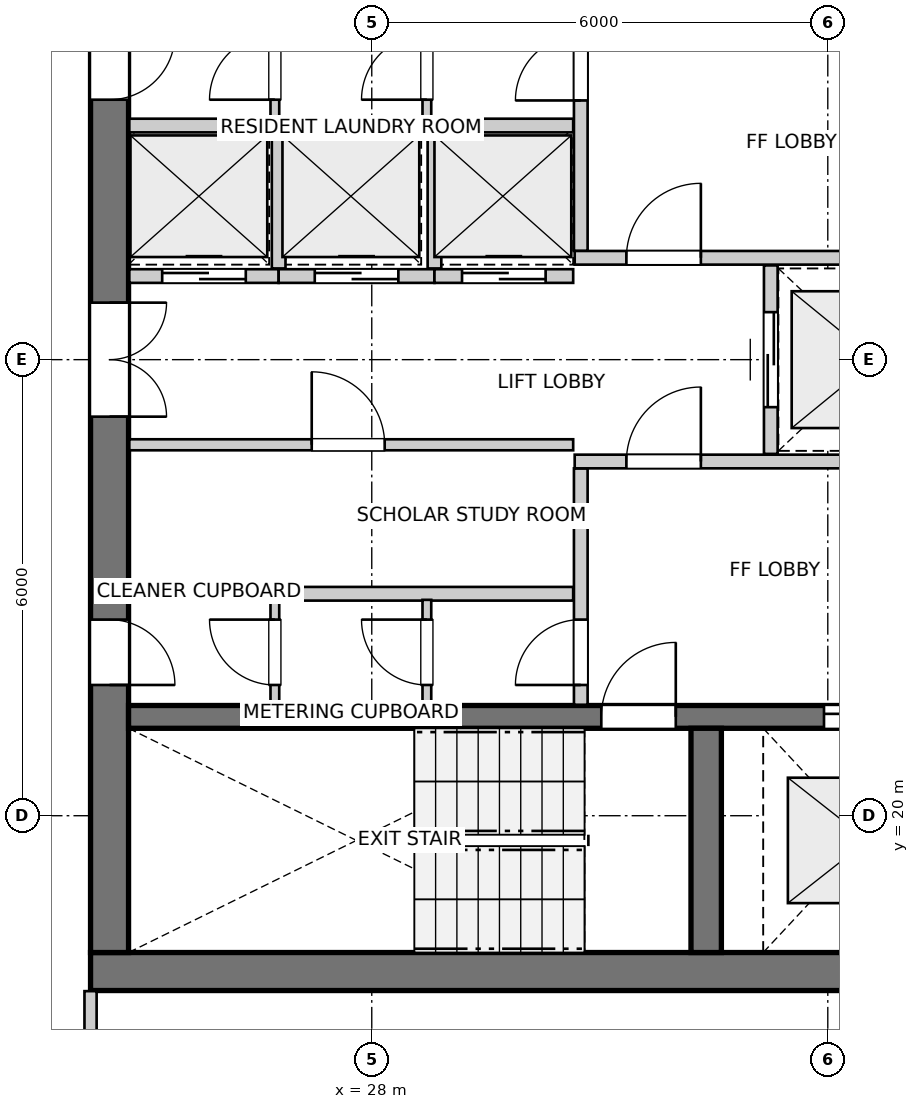
"""IFC4 building model, lengths in metres.
Left out: names, types, materials, properties, quantities, classifications, styles, units other than length and angle.
Written with IfcOpenShell. Run it as: python <this file> out.ifc"""

import sys

from ifc_helpers import new_model, si_unit, direction, frame, frame_2d, origin, place, context, subcontext, project, spatial, rectangle, extrude, source, transform, mapped, element, fill, save


model = new_model("IFC4")
c1 = context("Model", 3, precision=1e-05, world=origin(), true_north=direction((0.0, 1.0)))
c2 = subcontext(c1, "Body", "Model", "MODEL_VIEW")
j1 = project(units=[si_unit("LENGTHUNIT", "METRE"), si_unit("PLANEANGLEUNIT", "RADIAN")], contexts=[c1])
p1 = place(None, origin())
s1 = spatial("IfcSite", under=j1, at=p1, CompositionType="ELEMENT")
p2 = place(p1, origin())
s2 = spatial("IfcBuilding", under=s1, at=p2, CompositionType="ELEMENT")
p3 = place(p2, frame((0.0, 0.0, 218.0)))
s3 = spatial("IfcBuildingStorey", under=s2, at=p3, CompositionType="ELEMENT", Elevation=218.0)
p4 = place(p3, frame((24.3, 17.95, 0.0), z_axis=(0.0, 0.0, 1.0), x_axis=(1.0, 0.0, 0.0)))
e1 = element("IfcWall", 1, at=p4, inside=s3, PredefinedType="SHEAR", context=c2, shape_type="SweptSolid", body=[
    extrude(rectangle(XDim=12.1, YDim=0.5, at=frame_2d((6.05, 0.0))), origin(), (0.0, 0.0, 1.0), 2.96),
])
p5 = place(p3, frame((24.55, 33.8, 0.0), z_axis=(0.0, 0.0, 1.0), x_axis=(0.0, -1.0, 0.0)))
e2 = element("IfcWall", 2, at=p5, inside=s3, PredefinedType="SHEAR", context=c2, shape_type="SweptSolid", body=[
    extrude(rectangle(XDim=15.6, YDim=0.5, at=frame_2d((7.8, 0.0))), origin(), (0.0, 0.0, 1.0), 2.96),
])
p6 = place(p5, frame((7.05, 0.0, 0.0)))
e3 = element("IfcOpeningElement", 3, at=p6, cuts=e2, PredefinedType="OPENING", context=c2, shape_type="SweptSolid", body=[
    extrude(rectangle(XDim=1.5, YDim=2.15, at=frame_2d((0.75, 1.075))), frame((0.0, 0.26, 0.0), z_axis=(0.0, -1.0, 0.0), x_axis=(1.0, 0.0, 0.0)), (0.0, 0.0, 1.0), 0.52),
])
p7 = place(p5, frame((3.52, 0.0, 0.0)))
e4 = element("IfcOpeningElement", 4, at=p7, cuts=e2, PredefinedType="OPENING", context=c2, shape_type="SweptSolid", body=[
    extrude(rectangle(XDim=0.86, YDim=2.05, at=frame_2d((0.43, 1.025))), frame((0.0, 0.26, 0.0), z_axis=(0.0, -1.0, 0.0), x_axis=(1.0, 0.0, 0.0)), (0.0, 0.0, 1.0), 0.52),
])
p8 = place(p5, frame((11.22, 0.0, 0.0)))
e5 = element("IfcOpeningElement", 5, at=p8, cuts=e2, PredefinedType="OPENING", context=c2, shape_type="SweptSolid", body=[
    extrude(rectangle(XDim=0.86, YDim=2.05, at=frame_2d((0.43, 1.025))), frame((0.0, 0.26, 0.0), z_axis=(0.0, -1.0, 0.0), x_axis=(1.0, 0.0, 0.0)), (0.0, 0.0, 1.0), 0.52),
])
p9 = place(p3, frame((24.8, 21.3, 0.0), z_axis=(0.0, 0.0, 1.0), x_axis=(1.0, 0.0, 0.0)))
e6 = element("IfcWall", 6, at=p9, inside=s3, PredefinedType="SHEAR", context=c2, shape_type="SweptSolid", body=[
    extrude(rectangle(XDim=11.1, YDim=0.3, at=frame_2d((5.55, 0.0))), origin(), (0.0, 0.0, 1.0), 2.96),
])
p10 = place(p9, frame((6.22, 0.0, 0.0)))
e7 = element("IfcOpeningElement", 7, at=p10, cuts=e6, PredefinedType="OPENING", context=c2, shape_type="SweptSolid", body=[
    extrude(rectangle(XDim=0.98, YDim=2.15, at=frame_2d((0.49, 1.075))), frame((0.0, 0.16, 0.0), z_axis=(0.0, -1.0, 0.0), x_axis=(1.0, 0.0, 0.0)), (0.0, 0.0, 1.0), 0.32),
])
p11 = place(p9, frame((9.15, 0.0, 0.0)))
e8 = element("IfcOpeningElement", 8, at=p11, cuts=e6, PredefinedType="OPENING", context=c2, shape_type="SweptSolid", body=[
    extrude(rectangle(XDim=1.15, YDim=2.15, at=frame_2d((0.575, 1.075))), frame((0.0, 0.16, 0.0), z_axis=(0.0, -1.0, 0.0), x_axis=(1.0, 0.0, 0.0)), (0.0, 0.0, 1.0), 0.32),
])
p12 = place(p3, frame((32.4, 18.2, 0.0), z_axis=(0.0, 0.0, 1.0), x_axis=(0.0, 1.0, 0.0)))
e9 = element("IfcWall", 9, at=p12, inside=s3, PredefinedType="SHEAR", context=c2, shape_type="SweptSolid", body=[
    extrude(rectangle(XDim=2.95, YDim=0.4, at=frame_2d((1.475, 0.0))), origin(), (0.0, 0.0, 1.0), 2.96),
])
p13 = place(p3, frame((30.75, 21.46, 0.0), z_axis=(0.0, 0.0, 1.0), x_axis=(0.0, 1.0, 0.0)))
e10 = element("IfcWall", 10, at=p13, inside=s3, PredefinedType="PARTITIONING", context=c2, shape_type="SweptSolid", body=[
    extrude(rectangle(XDim=3.11, YDim=0.18, at=frame_2d((1.555, 0.0))), origin(), (0.0, 0.0, 1.0), 2.96),
])
p14 = place(p13, frame((0.26, 0.0, 0.0)))
e11 = element("IfcOpeningElement", 11, at=p14, cuts=e10, PredefinedType="OPENING", context=c2, shape_type="SweptSolid", body=[
    extrude(rectangle(XDim=0.86, YDim=2.05, at=frame_2d((0.43, 1.025))), frame((0.0, 0.1, 0.0), z_axis=(0.0, -1.0, 0.0), x_axis=(1.0, 0.0, 0.0)), (0.0, 0.0, 1.0), 0.2),
])
p15 = place(p3, frame((30.67, 24.66, 0.0), z_axis=(0.0, 0.0, 1.0), x_axis=(1.0, 0.0, 0.0)))
e12 = element("IfcWall", 12, at=p15, inside=s3, PredefinedType="PARTITIONING", context=c2, shape_type="SweptSolid", body=[
    extrude(rectangle(XDim=5.22, YDim=0.18, at=frame_2d((2.61, 0.0))), origin(), (0.0, 0.0, 1.0), 2.96),
])
p16 = place(p15, frame((0.68, 0.0, 0.0)))
e13 = element("IfcOpeningElement", 13, at=p16, cuts=e12, PredefinedType="OPENING", context=c2, shape_type="SweptSolid", body=[
    extrude(rectangle(XDim=0.98, YDim=2.15, at=frame_2d((0.49, 1.075))), frame((0.0, 0.1, 0.0), z_axis=(0.0, -1.0, 0.0), x_axis=(1.0, 0.0, 0.0)), (0.0, 0.0, 1.0), 0.2),
])
p17 = place(p3, frame((30.75, 27.43, 0.0), z_axis=(0.0, 0.0, 1.0), x_axis=(0.0, 1.0, 0.0)))
e14 = element("IfcWall", 14, at=p17, inside=s3, PredefinedType="PARTITIONING", context=c2, shape_type="SweptSolid", body=[
    extrude(rectangle(XDim=3.11, YDim=0.18, at=frame_2d((1.555, 0.0))), origin(), (0.0, 0.0, 1.0), 2.96),
])
p18 = place(p17, frame((1.98, 0.0, 0.0)))
e15 = element("IfcOpeningElement", 15, at=p18, cuts=e14, PredefinedType="OPENING", context=c2, shape_type="SweptSolid", body=[
    extrude(rectangle(XDim=0.86, YDim=2.05, at=frame_2d((0.43, 1.025))), frame((0.0, 0.1, 0.0), z_axis=(0.0, -1.0, 0.0), x_axis=(1.0, 0.0, 0.0)), (0.0, 0.0, 1.0), 0.2),
])
p19 = place(p3, frame((30.67, 27.34, 0.0), z_axis=(0.0, 0.0, 1.0), x_axis=(1.0, 0.0, 0.0)))
e16 = element("IfcWall", 16, at=p19, inside=s3, PredefinedType="PARTITIONING", context=c2, shape_type="SweptSolid", body=[
    extrude(rectangle(XDim=5.22, YDim=0.18, at=frame_2d((2.61, 0.0))), origin(), (0.0, 0.0, 1.0), 2.96),
])
p20 = place(p19, frame((0.68, 0.0, 0.0)))
e17 = element("IfcOpeningElement", 17, at=p20, cuts=e16, PredefinedType="OPENING", context=c2, shape_type="SweptSolid", body=[
    extrude(rectangle(XDim=0.98, YDim=2.15, at=frame_2d((0.49, 1.075))), frame((0.0, 0.1, 0.0), z_axis=(0.0, -1.0, 0.0), x_axis=(1.0, 0.0, 0.0)), (0.0, 0.0, 1.0), 0.2),
])
p21 = place(p3, frame((33.25, 24.76, 0.0), z_axis=(0.0, 0.0, 1.0), x_axis=(0.0, 1.0, 0.0)))
e18 = element("IfcWall", 18, at=p21, inside=s3, PredefinedType="PARTITIONING", context=c2, shape_type="SweptSolid", body=[
    extrude(rectangle(XDim=2.48, YDim=0.18, at=frame_2d((1.24, 0.0))), origin(), (0.0, 0.0, 1.0), 2.96),
])
p22 = place(p21, frame((0.615, 0.0, 0.0)))
e19 = element("IfcOpeningElement", 19, at=p22, cuts=e18, PredefinedType="OPENING", context=c2, shape_type="SweptSolid", body=[
    extrude(rectangle(XDim=1.25, YDim=2.15, at=frame_2d((0.625, 1.075))), frame((0.0, 0.1, 0.0), z_axis=(0.0, -1.0, 0.0), x_axis=(1.0, 0.0, 0.0)), (0.0, 0.0, 1.0), 0.2),
])
p23 = place(p3, frame((24.81, 22.92, 0.0), z_axis=(0.0, 0.0, 1.0), x_axis=(1.0, 0.0, 0.0)))
e20 = element("IfcWall", 20, at=p23, inside=s3, PredefinedType="PARTITIONING", context=c2, shape_type="SweptSolid", body=[
    extrude(rectangle(XDim=5.84, YDim=0.18, at=frame_2d((2.92, 0.0))), origin(), (0.0, 0.0, 1.0), 2.96),
])
p24 = place(p3, frame((24.81, 24.88, 0.0), z_axis=(0.0, 0.0, 1.0), x_axis=(1.0, 0.0, 0.0)))
e21 = element("IfcWall", 21, at=p24, inside=s3, PredefinedType="PARTITIONING", context=c2, shape_type="SweptSolid", body=[
    extrude(rectangle(XDim=5.84, YDim=0.145, at=frame_2d((2.92, 0.0))), origin(), (0.0, 0.0, 1.0), 2.96),
])
p25 = place(p24, frame((2.4, 0.0, 0.0)))
e22 = element("IfcOpeningElement", 22, at=p25, cuts=e21, PredefinedType="OPENING", context=c2, shape_type="SweptSolid", body=[
    extrude(rectangle(XDim=0.96, YDim=2.1, at=frame_2d((0.48, 1.05))), frame((0.0, 0.083, 0.0), z_axis=(0.0, -1.0, 0.0), x_axis=(1.0, 0.0, 0.0)), (0.0, 0.0, 1.0), 0.165),
])
p26 = place(p3, frame((24.81, 29.08, 0.0), z_axis=(0.0, 0.0, 1.0), x_axis=(1.0, 0.0, 0.0)))
e23 = element("IfcWall", 23, at=p26, inside=s3, PredefinedType="PARTITIONING", context=c2, shape_type="SweptSolid", body=[
    extrude(rectangle(XDim=5.84, YDim=0.18, at=frame_2d((2.92, 0.0))), origin(), (0.0, 0.0, 1.0), 2.96),
])
p27 = place(p3, frame((24.81, 27.1, 0.0), z_axis=(0.0, 0.0, 1.0), x_axis=(1.0, 0.0, 0.0)))
e24 = element("IfcWall", 24, at=p27, inside=s3, PredefinedType="PARTITIONING", context=c2, shape_type="SweptSolid", body=[
    extrude(rectangle(XDim=1.965, YDim=0.18, at=frame_2d((0.982, 0.0))), origin(), (0.0, 0.0, 1.0), 2.96),
])
p28 = place(p27, frame((0.433, 0.0, 0.0)))
e25 = element("IfcOpeningElement", 25, at=p28, cuts=e24, PredefinedType="OPENING", context=c2, shape_type="SweptSolid", body=[
    extrude(rectangle(XDim=1.1, YDim=2.15, at=frame_2d((0.55, 1.075))), frame((0.0, 0.1, 0.0), z_axis=(0.0, -1.0, 0.0), x_axis=(1.0, 0.0, 0.0)), (0.0, 0.0, 1.0), 0.2),
])
p29 = place(p3, frame((26.775, 27.1, 0.0), z_axis=(0.0, 0.0, 1.0), x_axis=(1.0, 0.0, 0.0)))
e26 = element("IfcWall", 26, at=p29, inside=s3, PredefinedType="PARTITIONING", context=c2, shape_type="SweptSolid", body=[
    extrude(rectangle(XDim=2.05, YDim=0.18, at=frame_2d((1.025, 0.0))), origin(), (0.0, 0.0, 1.0), 2.96),
])
p30 = place(p29, frame((0.475, 0.0, 0.0)))
e27 = element("IfcOpeningElement", 27, at=p30, cuts=e26, PredefinedType="OPENING", context=c2, shape_type="SweptSolid", body=[
    extrude(rectangle(XDim=1.1, YDim=2.15, at=frame_2d((0.55, 1.075))), frame((0.0, 0.1, 0.0), z_axis=(0.0, -1.0, 0.0), x_axis=(1.0, 0.0, 0.0)), (0.0, 0.0, 1.0), 0.2),
])
p31 = place(p3, frame((26.775, 27.2, 0.0), z_axis=(0.0, 0.0, 1.0), x_axis=(0.0, 1.0, 0.0)))
e28 = element("IfcWall", 28, at=p31, inside=s3, PredefinedType="PARTITIONING", context=c2, shape_type="SweptSolid", body=[
    extrude(rectangle(XDim=1.78, YDim=0.18, at=frame_2d((0.89, 0.0))), origin(), (0.0, 0.0, 1.0), 2.96),
])
p32 = place(p3, frame((28.825, 27.1, 0.0), z_axis=(0.0, 0.0, 1.0), x_axis=(1.0, 0.0, 0.0)))
e29 = element("IfcWall", 29, at=p32, inside=s3, PredefinedType="PARTITIONING", context=c2, shape_type="SweptSolid", body=[
    extrude(rectangle(XDim=1.825, YDim=0.18, at=frame_2d((0.913, 0.0))), origin(), (0.0, 0.0, 1.0), 2.96),
])
p33 = place(p32, frame((0.363, 0.0, 0.0)))
e30 = element("IfcOpeningElement", 30, at=p33, cuts=e29, PredefinedType="OPENING", context=c2, shape_type="SweptSolid", body=[
    extrude(rectangle(XDim=1.1, YDim=2.15, at=frame_2d((0.55, 1.075))), frame((0.0, 0.1, 0.0), z_axis=(0.0, -1.0, 0.0), x_axis=(1.0, 0.0, 0.0)), (0.0, 0.0, 1.0), 0.2),
])
p34 = place(p3, frame((28.825, 27.2, 0.0), z_axis=(0.0, 0.0, 1.0), x_axis=(0.0, 1.0, 0.0)))
e31 = element("IfcWall", 31, at=p34, inside=s3, PredefinedType="PARTITIONING", context=c2, shape_type="SweptSolid", body=[
    extrude(rectangle(XDim=1.78, YDim=0.18, at=frame_2d((0.89, 0.0))), origin(), (0.0, 0.0, 1.0), 2.96),
])
p35 = place(p3, frame((26.725, 21.46, 0.0), z_axis=(0.0, 0.0, 1.0), x_axis=(0.0, 1.0, 0.0)))
e32 = element("IfcWall", 32, at=p35, inside=s3, PredefinedType="PARTITIONING", context=c2, shape_type="SweptSolid", body=[
    extrude(rectangle(XDim=1.38, YDim=0.115, at=frame_2d((0.69, 0.0))), origin(), (0.0, 0.0, 1.0), 2.96),
])
p36 = place(p35, frame((0.26, 0.0, 0.0)))
e33 = element("IfcOpeningElement", 33, at=p36, cuts=e32, PredefinedType="OPENING", context=c2, shape_type="SweptSolid", body=[
    extrude(rectangle(XDim=0.86, YDim=2.05, at=frame_2d((0.43, 1.025))), frame((0.0, 0.067, 0.0), z_axis=(0.0, -1.0, 0.0), x_axis=(1.0, 0.0, 0.0)), (0.0, 0.0, 1.0), 0.135),
])
p37 = place(p3, frame((26.725, 29.16, 0.0), z_axis=(0.0, 0.0, 1.0), x_axis=(0.0, 1.0, 0.0)))
e34 = element("IfcWall", 34, at=p37, inside=s3, PredefinedType="PARTITIONING", context=c2, shape_type="SweptSolid", body=[
    extrude(rectangle(XDim=1.38, YDim=0.115, at=frame_2d((0.69, 0.0))), origin(), (0.0, 0.0, 1.0), 2.96),
])
p38 = place(p37, frame((0.26, 0.0, 0.0)))
e35 = element("IfcOpeningElement", 35, at=p38, cuts=e34, PredefinedType="OPENING", context=c2, shape_type="SweptSolid", body=[
    extrude(rectangle(XDim=0.86, YDim=2.05, at=frame_2d((0.43, 1.025))), frame((0.0, 0.067, 0.0), z_axis=(0.0, -1.0, 0.0), x_axis=(1.0, 0.0, 0.0)), (0.0, 0.0, 1.0), 0.135),
])
p39 = place(p3, frame((28.725, 21.46, 0.0), z_axis=(0.0, 0.0, 1.0), x_axis=(0.0, 1.0, 0.0)))
e36 = element("IfcWall", 36, at=p39, inside=s3, PredefinedType="PARTITIONING", context=c2, shape_type="SweptSolid", body=[
    extrude(rectangle(XDim=1.38, YDim=0.115, at=frame_2d((0.69, 0.0))), origin(), (0.0, 0.0, 1.0), 2.96),
])
p40 = place(p39, frame((0.26, 0.0, 0.0)))
e37 = element("IfcOpeningElement", 37, at=p40, cuts=e36, PredefinedType="OPENING", context=c2, shape_type="SweptSolid", body=[
    extrude(rectangle(XDim=0.86, YDim=2.05, at=frame_2d((0.43, 1.025))), frame((0.0, 0.067, 0.0), z_axis=(0.0, -1.0, 0.0), x_axis=(1.0, 0.0, 0.0)), (0.0, 0.0, 1.0), 0.135),
])
p41 = place(p3, frame((28.725, 29.16, 0.0), z_axis=(0.0, 0.0, 1.0), x_axis=(0.0, 1.0, 0.0)))
e38 = element("IfcWall", 38, at=p41, inside=s3, PredefinedType="PARTITIONING", context=c2, shape_type="SweptSolid", body=[
    extrude(rectangle(XDim=1.38, YDim=0.115, at=frame_2d((0.69, 0.0))), origin(), (0.0, 0.0, 1.0), 2.96),
])
p42 = place(p41, frame((0.26, 0.0, 0.0)))
e39 = element("IfcOpeningElement", 39, at=p42, cuts=e38, PredefinedType="OPENING", context=c2, shape_type="SweptSolid", body=[
    extrude(rectangle(XDim=0.86, YDim=2.05, at=frame_2d((0.43, 1.025))), frame((0.0, 0.067, 0.0), z_axis=(0.0, -1.0, 0.0), x_axis=(1.0, 0.0, 0.0)), (0.0, 0.0, 1.0), 0.135),
])
p43 = place(p3, frame((24.3, 15.042, 0.0), z_axis=(0.0, 0.0, 1.0), x_axis=(0.0, 1.0, 0.0)))
e40 = element("IfcWall", 40, at=p43, inside=s3, PredefinedType="PARTITIONING", context=c2, shape_type="SweptSolid", body=[
    extrude(rectangle(XDim=2.65, YDim=0.16, at=frame_2d((1.325, 0.0))), origin(), (0.0, 0.0, 1.0), 2.96),
])
m1 = source(origin(), c2, "Body", "SweptSolid", [
    extrude(rectangle(XDim=0.98, YDim=2.15, at=frame_2d((0.49, 1.075))), frame((0.0, 0.025, 0.0), z_axis=(0.0, -1.0, 0.0), x_axis=(1.0, 0.0, 0.0)), (0.0, 0.0, 1.0), 0.05),
])
p44 = place(p10, origin())
e41 = element("IfcDoor", 41, at=p44, inside=s3, OperationType="SINGLE_SWING_RIGHT", PredefinedType="DOOR", context=c2, shape_type="MappedRepresentation", body=[
    mapped(m1, transform((0.0, 0.0, 0.0), x_axis=(1.0, 0.0, 0.0), y_axis=(0.0, 1.0, 0.0), z_axis=(0.0, 0.0, 1.0), scale=1.0)),
])
fill(e7, e41)
m2 = source(origin(), c2, "Body", "SweptSolid", [
    extrude(rectangle(XDim=1.15, YDim=2.15, at=frame_2d((0.575, 1.075))), frame((0.0, 0.025, 0.0), z_axis=(0.0, -1.0, 0.0), x_axis=(1.0, 0.0, 0.0)), (0.0, 0.0, 1.0), 0.05),
])
p45 = place(p11, origin())
e42 = element("IfcDoor", 42, at=p45, inside=s3, OperationType="DOUBLE_DOOR_SLIDING", PredefinedType="DOOR", context=c2, shape_type="MappedRepresentation", body=[
    mapped(m2, transform((0.0, 0.0, 0.0), x_axis=(1.0, 0.0, 0.0), y_axis=(0.0, 1.0, 0.0), z_axis=(0.0, 0.0, 1.0), scale=1.0)),
])
fill(e8, e42)
m3 = source(origin(), c2, "Body", "SweptSolid", [
    extrude(rectangle(XDim=1.5, YDim=2.15, at=frame_2d((0.75, 1.075))), frame((0.0, 0.025, 0.0), z_axis=(0.0, -1.0, 0.0), x_axis=(1.0, 0.0, 0.0)), (0.0, 0.0, 1.0), 0.05),
])
p46 = place(p6, origin())
e43 = element("IfcDoor", 43, at=p46, inside=s3, OperationType="DOUBLE_DOOR_SINGLE_SWING", PredefinedType="DOOR", context=c2, shape_type="MappedRepresentation", body=[
    mapped(m3, transform((0.0, 0.0, 0.0), x_axis=(1.0, 0.0, 0.0), y_axis=(0.0, 1.0, 0.0), z_axis=(0.0, 0.0, 1.0), scale=1.0)),
])
fill(e3, e43)
m4 = source(origin(), c2, "Body", "SweptSolid", [
    extrude(rectangle(XDim=0.86, YDim=2.05, at=frame_2d((0.43, 1.025))), frame((0.0, 0.025, 0.0), z_axis=(0.0, -1.0, 0.0), x_axis=(1.0, 0.0, 0.0)), (0.0, 0.0, 1.0), 0.05),
])
p47 = place(p7, origin())
e44 = element("IfcDoor", 44, at=p47, inside=s3, OperationType="SINGLE_SWING_LEFT", PredefinedType="DOOR", context=c2, shape_type="MappedRepresentation", body=[
    mapped(m4, transform((0.0, 0.0, 0.0), x_axis=(1.0, 0.0, 0.0), y_axis=(0.0, 1.0, 0.0), z_axis=(0.0, 0.0, 1.0), scale=1.0)),
])
fill(e4, e44)
p48 = place(p8, origin())
e45 = element("IfcDoor", 45, at=p48, inside=s3, OperationType="SINGLE_SWING_RIGHT", PredefinedType="DOOR", context=c2, shape_type="MappedRepresentation", body=[
    mapped(m4, transform((0.0, 0.0, 0.0), x_axis=(1.0, 0.0, 0.0), y_axis=(0.0, 1.0, 0.0), z_axis=(0.0, 0.0, 1.0), scale=1.0)),
])
fill(e5, e45)
p49 = place(p14, origin())
e46 = element("IfcDoor", 46, at=p49, inside=s3, OperationType="SINGLE_SWING_LEFT", PredefinedType="DOOR", context=c2, shape_type="MappedRepresentation", body=[
    mapped(m4, transform((0.0, 0.0, 0.0), x_axis=(1.0, 0.0, 0.0), y_axis=(0.0, 1.0, 0.0), z_axis=(0.0, 0.0, 1.0), scale=1.0)),
])
fill(e11, e46)
p50 = place(p16, origin())
e47 = element("IfcDoor", 47, at=p50, inside=s3, OperationType="SINGLE_SWING_RIGHT", PredefinedType="DOOR", context=c2, shape_type="MappedRepresentation", body=[
    mapped(m1, transform((0.0, 0.0, 0.0), x_axis=(1.0, 0.0, 0.0), y_axis=(0.0, 1.0, 0.0), z_axis=(0.0, 0.0, 1.0), scale=1.0)),
])
fill(e13, e47)
p51 = place(p18, origin())
e48 = element("IfcDoor", 48, at=p51, inside=s3, OperationType="SINGLE_SWING_LEFT", PredefinedType="DOOR", context=c2, shape_type="MappedRepresentation", body=[
    mapped(m4, transform((0.0, 0.0, 0.0), x_axis=(1.0, 0.0, 0.0), y_axis=(0.0, 1.0, 0.0), z_axis=(0.0, 0.0, 1.0), scale=1.0)),
])
fill(e15, e48)
p52 = place(p20, origin())
e49 = element("IfcDoor", 49, at=p52, inside=s3, OperationType="SINGLE_SWING_RIGHT", PredefinedType="DOOR", context=c2, shape_type="MappedRepresentation", body=[
    mapped(m1, transform((0.0, 0.0, 0.0), x_axis=(1.0, 0.0, 0.0), y_axis=(0.0, 1.0, 0.0), z_axis=(0.0, 0.0, 1.0), scale=1.0)),
])
fill(e17, e49)
m5 = source(origin(), c2, "Body", "SweptSolid", [
    extrude(rectangle(XDim=1.25, YDim=2.15, at=frame_2d((0.625, 1.075))), frame((0.0, 0.025, 0.0), z_axis=(0.0, -1.0, 0.0), x_axis=(1.0, 0.0, 0.0)), (0.0, 0.0, 1.0), 0.05),
])
p53 = place(p22, origin())
e50 = element("IfcDoor", 50, at=p53, inside=s3, OperationType="DOUBLE_DOOR_SLIDING", PredefinedType="DOOR", context=c2, shape_type="MappedRepresentation", body=[
    mapped(m5, transform((0.0, 0.0, 0.0), x_axis=(1.0, 0.0, 0.0), y_axis=(0.0, 1.0, 0.0), z_axis=(0.0, 0.0, 1.0), scale=1.0)),
])
fill(e19, e50)
m6 = source(origin(), c2, "Body", "SweptSolid", [
    extrude(rectangle(XDim=0.96, YDim=2.1, at=frame_2d((0.48, 1.05))), frame((0.0, 0.025, 0.0), z_axis=(0.0, -1.0, 0.0), x_axis=(1.0, 0.0, 0.0)), (0.0, 0.0, 1.0), 0.05),
])
p54 = place(p25, origin())
e51 = element("IfcDoor", 51, at=p54, inside=s3, OperationType="SINGLE_SWING_LEFT", PredefinedType="DOOR", context=c2, shape_type="MappedRepresentation", body=[
    mapped(m6, transform((0.0, 0.0, 0.0), x_axis=(1.0, 0.0, 0.0), y_axis=(0.0, 1.0, 0.0), z_axis=(0.0, 0.0, 1.0), scale=1.0)),
])
fill(e22, e51)
m7 = source(origin(), c2, "Body", "SweptSolid", [
    extrude(rectangle(XDim=1.1, YDim=2.15, at=frame_2d((0.55, 1.075))), frame((0.0, 0.025, 0.0), z_axis=(0.0, -1.0, 0.0), x_axis=(1.0, 0.0, 0.0)), (0.0, 0.0, 1.0), 0.05),
])
p55 = place(p28, origin())
e52 = element("IfcDoor", 52, at=p55, inside=s3, OperationType="DOUBLE_DOOR_SLIDING", PredefinedType="DOOR", context=c2, shape_type="MappedRepresentation", body=[
    mapped(m7, transform((0.0, 0.0, 0.0), x_axis=(1.0, 0.0, 0.0), y_axis=(0.0, 1.0, 0.0), z_axis=(0.0, 0.0, 1.0), scale=1.0)),
])
fill(e25, e52)
p56 = place(p30, origin())
e53 = element("IfcDoor", 53, at=p56, inside=s3, OperationType="DOUBLE_DOOR_SLIDING", PredefinedType="DOOR", context=c2, shape_type="MappedRepresentation", body=[
    mapped(m7, transform((0.0, 0.0, 0.0), x_axis=(1.0, 0.0, 0.0), y_axis=(0.0, 1.0, 0.0), z_axis=(0.0, 0.0, 1.0), scale=1.0)),
])
fill(e27, e53)
p57 = place(p33, origin())
e54 = element("IfcDoor", 54, at=p57, inside=s3, OperationType="DOUBLE_DOOR_SLIDING", PredefinedType="DOOR", context=c2, shape_type="MappedRepresentation", body=[
    mapped(m7, transform((0.0, 0.0, 0.0), x_axis=(1.0, 0.0, 0.0), y_axis=(0.0, 1.0, 0.0), z_axis=(0.0, 0.0, 1.0), scale=1.0)),
])
fill(e30, e54)
p58 = place(p36, origin())
e55 = element("IfcDoor", 55, at=p58, inside=s3, OperationType="SINGLE_SWING_RIGHT", PredefinedType="DOOR", context=c2, shape_type="MappedRepresentation", body=[
    mapped(m4, transform((0.0, 0.0, 0.0), x_axis=(1.0, 0.0, 0.0), y_axis=(0.0, 1.0, 0.0), z_axis=(0.0, 0.0, 1.0), scale=1.0)),
])
fill(e33, e55)
p59 = place(p38, origin())
e56 = element("IfcDoor", 56, at=p59, inside=s3, OperationType="SINGLE_SWING_LEFT", PredefinedType="DOOR", context=c2, shape_type="MappedRepresentation", body=[
    mapped(m4, transform((0.0, 0.0, 0.0), x_axis=(1.0, 0.0, 0.0), y_axis=(0.0, 1.0, 0.0), z_axis=(0.0, 0.0, 1.0), scale=1.0)),
])
fill(e35, e56)
p60 = place(p40, origin())
e57 = element("IfcDoor", 57, at=p60, inside=s3, OperationType="SINGLE_SWING_RIGHT", PredefinedType="DOOR", context=c2, shape_type="MappedRepresentation", body=[
    mapped(m4, transform((0.0, 0.0, 0.0), x_axis=(1.0, 0.0, 0.0), y_axis=(0.0, 1.0, 0.0), z_axis=(0.0, 0.0, 1.0), scale=1.0)),
])
fill(e37, e57)
p61 = place(p42, origin())
e58 = element("IfcDoor", 58, at=p61, inside=s3, OperationType="SINGLE_SWING_LEFT", PredefinedType="DOOR", context=c2, shape_type="MappedRepresentation", body=[
    mapped(m4, transform((0.0, 0.0, 0.0), x_axis=(1.0, 0.0, 0.0), y_axis=(0.0, 1.0, 0.0), z_axis=(0.0, 0.0, 1.0), scale=1.0)),
])
fill(e39, e58)
save(model, sys.argv[1])
